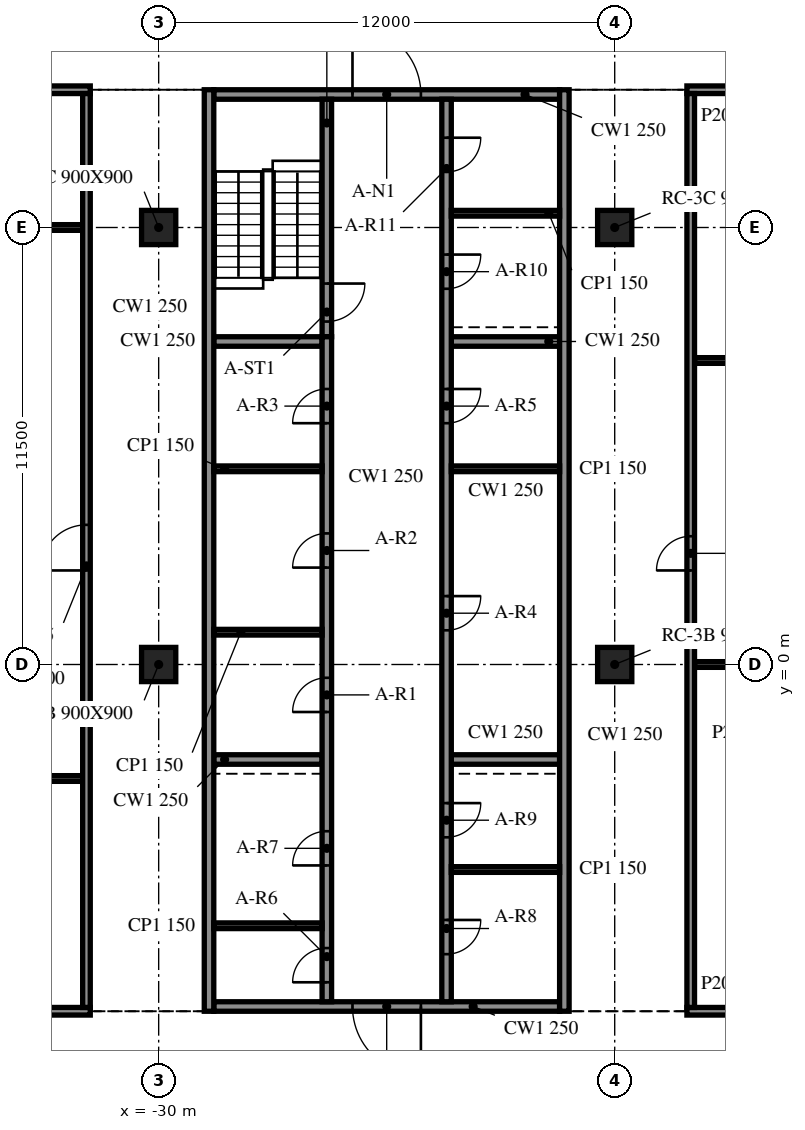
"""IFC4 building model, lengths in metres.
Left out: names, types, materials, properties, quantities, classifications, styles, units other than length and angle.
Written with IfcOpenShell. Run it as: python <this file> out.ifc"""

import sys

from ifc_helpers import new_model, si_unit, direction, frame, frame_2d, origin, origin_2d, place, context, subcontext, project, spatial, rectangle, extrude, element, fill, save


model = new_model("IFC4")
c1 = context("Model", 3, precision=1e-05, world=origin(), true_north=direction((0.0, 1.0)))
c2 = subcontext(c1, "Body", "Model", "MODEL_VIEW")
j1 = project(units=[si_unit("LENGTHUNIT", "METRE"), si_unit("PLANEANGLEUNIT", "RADIAN")], contexts=[c1])
p1 = place(None, origin())
s1 = spatial("IfcSite", under=j1, at=p1, CompositionType="ELEMENT")
p2 = place(p1, origin())
s2 = spatial("IfcBuilding", under=s1, at=p2, CompositionType="ELEMENT")
p3 = place(p2, frame((0.0, 0.0, 263.3)))
s3 = spatial("IfcBuildingStorey", under=s2, at=p3, CompositionType="ELEMENT", Elevation=263.3)
for number, where, z_axis, x_axis in (
    (1, (-30.0, 0.0, -0.34), (0.0, 0.0, 1.0), (1.0, 0.0, 0.0)),
    (2, (-30.0, 11.5, -0.34), (0.0, 0.0, 1.0), (1.0, 0.0, 0.0)),
    (3, (-18.0, 0.0, -0.34), (0.0, 0.0, 1.0), (1.0, 0.0, 0.0)),
    (4, (-18.0, 11.5, -0.34), (0.0, 0.0, 1.0), (1.0, 0.0, 0.0)),
):
    element("IfcColumn", number, at=place(p3, frame(where, z_axis=z_axis, x_axis=x_axis)), inside=s3, PredefinedType="COLUMN", context=c2, shape_type="SweptSolid", body=[
        extrude(rectangle(XDim=0.9, YDim=0.9, at=origin_2d()), origin(), (0.0, 0.0, 1.0), 3.8),
    ])
for number, where, z_axis, x_axis in (
    (5, (-28.675, 15.125, 0.0), (0.0, 0.0, 1.0), (0.0, -1.0, 0.0)),
    (6, (-19.325, -9.125, 0.0), (0.0, 0.0, 1.0), (0.0, 1.0, 0.0)),
):
    element("IfcWall", number, at=place(p3, frame(where, z_axis=z_axis, x_axis=x_axis)), inside=s3, PredefinedType="SOLIDWALL", context=c2, shape_type="SweptSolid", body=[
        extrude(rectangle(XDim=24.25, YDim=0.25, at=frame_2d((12.125, 0.0))), origin(), (0.0, 0.0, 1.0), 3.46),
    ])
p4 = place(p3, frame((-19.45, -9.0, 0.0), z_axis=(0.0, 0.0, 1.0), x_axis=(-1.0, 0.0, 0.0)))
e7 = element("IfcWall", 7, at=p4, inside=s3, PredefinedType="SOLIDWALL", context=c2, shape_type="SweptSolid", body=[
    extrude(rectangle(XDim=9.1, YDim=0.25, at=frame_2d((4.55, 0.0))), origin(), (0.0, 0.0, 1.0), 3.46),
])
p5 = place(p4, frame((3.65, 0.0, 0.0)))
e8 = element("IfcOpeningElement", 8, at=p5, cuts=e7, PredefinedType="OPENING", context=c2, shape_type="SweptSolid", body=[
    extrude(rectangle(XDim=1.8, YDim=2.1, at=frame_2d((0.9, 1.05))), frame((0.0, 0.135, 0.0), z_axis=(0.0, -1.0, 0.0), x_axis=(1.0, 0.0, 0.0)), (0.0, 0.0, 1.0), 0.27),
])
p6 = place(p3, frame((-28.55, 15.0, 0.0), z_axis=(0.0, 0.0, 1.0), x_axis=(1.0, 0.0, 0.0)))
e9 = element("IfcWall", 9, at=p6, inside=s3, PredefinedType="SOLIDWALL", context=c2, shape_type="SweptSolid", body=[
    extrude(rectangle(XDim=9.1, YDim=0.25, at=frame_2d((4.55, 0.0))), origin(), (0.0, 0.0, 1.0), 3.46),
])
p7 = place(p6, frame((3.65, 0.0, 0.0)))
e10 = element("IfcOpeningElement", 10, at=p7, cuts=e9, PredefinedType="OPENING", context=c2, shape_type="SweptSolid", body=[
    extrude(rectangle(XDim=1.8, YDim=2.1, at=frame_2d((0.9, 1.05))), frame((0.0, 0.135, 0.0), z_axis=(0.0, -1.0, 0.0), x_axis=(1.0, 0.0, 0.0)), (0.0, 0.0, 1.0), 0.27),
])
p8 = place(p3, frame((-25.575, -8.875, 0.0), z_axis=(0.0, 0.0, 1.0), x_axis=(0.0, 1.0, 0.0)))
e11 = element("IfcWall", 11, at=p8, inside=s3, PredefinedType="SOLIDWALL", context=c2, shape_type="SweptSolid", body=[
    extrude(rectangle(XDim=17.5, YDim=0.25, at=frame_2d((8.75, 0.0))), origin(), (0.0, 0.0, 1.0), 3.46),
])
p9 = place(p8, frame((7.625, 0.0, 0.0)))
e12 = element("IfcOpeningElement", 12, at=p9, cuts=e11, PredefinedType="OPENING", context=c2, shape_type="SweptSolid", body=[
    extrude(rectangle(XDim=0.9, YDim=2.1, at=frame_2d((0.45, 1.05))), frame((0.0, 0.135, 0.0), z_axis=(0.0, -1.0, 0.0), x_axis=(1.0, 0.0, 0.0)), (0.0, 0.0, 1.0), 0.27),
])
p10 = place(p8, frame((11.425, 0.0, 0.0)))
e13 = element("IfcOpeningElement", 13, at=p10, cuts=e11, PredefinedType="OPENING", context=c2, shape_type="SweptSolid", body=[
    extrude(rectangle(XDim=0.9, YDim=2.1, at=frame_2d((0.45, 1.05))), frame((0.0, 0.135, 0.0), z_axis=(0.0, -1.0, 0.0), x_axis=(1.0, 0.0, 0.0)), (0.0, 0.0, 1.0), 0.27),
])
p11 = place(p8, frame((15.225, 0.0, 0.0)))
e14 = element("IfcOpeningElement", 14, at=p11, cuts=e11, PredefinedType="OPENING", context=c2, shape_type="SweptSolid", body=[
    extrude(rectangle(XDim=0.9, YDim=2.1, at=frame_2d((0.45, 1.05))), frame((0.0, 0.135, 0.0), z_axis=(0.0, -1.0, 0.0), x_axis=(1.0, 0.0, 0.0)), (0.0, 0.0, 1.0), 0.27),
])
p12 = place(p8, frame((0.512, 0.0, 0.0)))
e15 = element("IfcOpeningElement", 15, at=p12, cuts=e11, PredefinedType="OPENING", context=c2, shape_type="SweptSolid", body=[
    extrude(rectangle(XDim=0.9, YDim=2.1, at=frame_2d((0.45, 1.05))), frame((0.0, 0.135, 0.0), z_axis=(0.0, -1.0, 0.0), x_axis=(1.0, 0.0, 0.0)), (0.0, 0.0, 1.0), 0.27),
])
p13 = place(p8, frame((3.587, 0.0, 0.0)))
e16 = element("IfcOpeningElement", 16, at=p13, cuts=e11, PredefinedType="OPENING", context=c2, shape_type="SweptSolid", body=[
    extrude(rectangle(XDim=0.9, YDim=2.1, at=frame_2d((0.45, 1.05))), frame((0.0, 0.135, 0.0), z_axis=(0.0, -1.0, 0.0), x_axis=(1.0, 0.0, 0.0)), (0.0, 0.0, 1.0), 0.27),
])
p14 = place(p3, frame((-25.575, 14.875, 0.0), z_axis=(0.0, 0.0, 1.0), x_axis=(0.0, -1.0, 0.0)))
e17 = element("IfcWall", 17, at=p14, inside=s3, PredefinedType="SOLIDWALL", context=c2, shape_type="SweptSolid", body=[
    extrude(rectangle(XDim=6.25, YDim=0.25, at=frame_2d((3.125, 0.0))), origin(), (0.0, 0.0, 1.0), 3.46),
])
p15 = place(p14, frame((4.85, 0.0, 0.0)))
e18 = element("IfcOpeningElement", 18, at=p15, cuts=e17, PredefinedType="OPENING", context=c2, shape_type="SweptSolid", body=[
    extrude(rectangle(XDim=1.0, YDim=2.1, at=frame_2d((0.5, 1.05))), frame((0.0, 0.135, 0.0), z_axis=(0.0, -1.0, 0.0), x_axis=(1.0, 0.0, 0.0)), (0.0, 0.0, 1.0), 0.27),
])
p16 = place(p3, frame((-22.425, 14.875, 0.0), z_axis=(0.0, 0.0, 1.0), x_axis=(0.0, -1.0, 0.0)))
e19 = element("IfcWall", 19, at=p16, inside=s3, PredefinedType="SOLIDWALL", context=c2, shape_type="SweptSolid", body=[
    extrude(rectangle(XDim=23.75, YDim=0.25, at=frame_2d((11.875, 0.0))), origin(), (0.0, 0.0, 1.0), 3.46),
])
p17 = place(p16, frame((13.075, 0.0, 0.0)))
e20 = element("IfcOpeningElement", 20, at=p17, cuts=e19, PredefinedType="OPENING", context=c2, shape_type="SweptSolid", body=[
    extrude(rectangle(XDim=0.9, YDim=2.1, at=frame_2d((0.45, 1.05))), frame((0.0, 0.135, 0.0), z_axis=(0.0, -1.0, 0.0), x_axis=(1.0, 0.0, 0.0)), (0.0, 0.0, 1.0), 0.27),
])
p18 = place(p16, frame((7.625, 0.0, 0.0)))
e21 = element("IfcOpeningElement", 21, at=p18, cuts=e19, PredefinedType="OPENING", context=c2, shape_type="SweptSolid", body=[
    extrude(rectangle(XDim=0.9, YDim=2.1, at=frame_2d((0.45, 1.05))), frame((0.0, 0.135, 0.0), z_axis=(0.0, -1.0, 0.0), x_axis=(1.0, 0.0, 0.0)), (0.0, 0.0, 1.0), 0.27),
])
p19 = place(p16, frame((21.597, 0.0, 0.0)))
e22 = element("IfcOpeningElement", 22, at=p19, cuts=e19, PredefinedType="OPENING", context=c2, shape_type="SweptSolid", body=[
    extrude(rectangle(XDim=0.9, YDim=2.1, at=frame_2d((0.45, 1.05))), frame((0.0, 0.135, 0.0), z_axis=(0.0, -1.0, 0.0), x_axis=(1.0, 0.0, 0.0)), (0.0, 0.0, 1.0), 0.27),
])
p20 = place(p16, frame((18.522, 0.0, 0.0)))
e23 = element("IfcOpeningElement", 23, at=p20, cuts=e19, PredefinedType="OPENING", context=c2, shape_type="SweptSolid", body=[
    extrude(rectangle(XDim=0.9, YDim=2.1, at=frame_2d((0.45, 1.05))), frame((0.0, 0.135, 0.0), z_axis=(0.0, -1.0, 0.0), x_axis=(1.0, 0.0, 0.0)), (0.0, 0.0, 1.0), 0.27),
])
p21 = place(p16, frame((4.087, 0.0, 0.0)))
e24 = element("IfcOpeningElement", 24, at=p21, cuts=e19, PredefinedType="OPENING", context=c2, shape_type="SweptSolid", body=[
    extrude(rectangle(XDim=0.9, YDim=2.1, at=frame_2d((0.45, 1.05))), frame((0.0, 0.135, 0.0), z_axis=(0.0, -1.0, 0.0), x_axis=(1.0, 0.0, 0.0)), (0.0, 0.0, 1.0), 0.27),
])
p22 = place(p16, frame((1.012, 0.0, 0.0)))
e25 = element("IfcOpeningElement", 25, at=p22, cuts=e19, PredefinedType="OPENING", context=c2, shape_type="SweptSolid", body=[
    extrude(rectangle(XDim=0.9, YDim=2.1, at=frame_2d((0.45, 1.05))), frame((0.0, 0.135, 0.0), z_axis=(0.0, -1.0, 0.0), x_axis=(1.0, 0.0, 0.0)), (0.0, 0.0, 1.0), 0.27),
])
for number, where, z_axis, x_axis in (
    (26, (-28.55, -2.5, 0.0), (0.0, 0.0, 1.0), (1.0, 0.0, 0.0)),
    (27, (-28.55, 8.5, 0.0), (0.0, 0.0, 1.0), (1.0, 0.0, 0.0)),
    (28, (-22.3, -2.5, 0.0), (0.0, 0.0, 1.0), (1.0, 0.0, 0.0)),
    (29, (-22.3, 8.5, 0.0), (0.0, 0.0, 1.0), (1.0, 0.0, 0.0)),
):
    element("IfcWall", number, at=place(p3, frame(where, z_axis=z_axis, x_axis=x_axis)), inside=s3, PredefinedType="SOLIDWALL", context=c2, shape_type="SweptSolid", body=[
        extrude(rectangle(XDim=2.85, YDim=0.25, at=frame_2d((1.425, 0.0))), origin(), (0.0, 0.0, 1.0), 3.46),
    ])
for number, where, z_axis, x_axis in (
    (30, (-28.55, 0.85, 0.0), (0.0, 0.0, 1.0), (1.0, 0.0, 0.0)),
    (31, (-28.55, 5.15, 0.0), (0.0, 0.0, 1.0), (1.0, 0.0, 0.0)),
    (32, (-22.3, 5.15, 0.0), (0.0, 0.0, 1.0), (1.0, 0.0, 0.0)),
    (33, (-28.55, -6.875, 0.0), (0.0, 0.0, 1.0), (1.0, 0.0, 0.0)),
    (34, (-22.3, -5.395, 0.0), (0.0, 0.0, 1.0), (1.0, 0.0, 0.0)),
    (35, (-22.3, 11.875, 0.0), (0.0, 0.0, 1.0), (1.0, 0.0, 0.0)),
):
    element("IfcWall", number, at=place(p3, frame(where, z_axis=z_axis, x_axis=x_axis)), inside=s3, PredefinedType="PARTITIONING", context=c2, shape_type="SweptSolid", body=[
        extrude(rectangle(XDim=2.85, YDim=0.15, at=frame_2d((1.425, 0.0))), origin(), (0.0, 0.0, 1.0), 3.46),
    ])
p23 = place(p3, frame((-47.646, -9.125, 0.0), z_axis=(0.0, 0.0, 1.0), x_axis=(1.0, 0.0, 0.0)))
e36 = element("IfcWall", 36, at=p23, inside=s3, PredefinedType="PARTITIONING", context=c2, shape_type="SweptSolid", body=[
    extrude(rectangle(XDim=15.845, YDim=0.2, at=frame_2d((7.923, 0.0))), origin(), (0.0, 0.0, 1.0), 3.46),
])
p24 = place(p23, frame((7.3, 0.0, 0.0)))
e37 = element("IfcOpeningElement", 37, at=p24, cuts=e36, PredefinedType="OPENING", context=c2, shape_type="SweptSolid", body=[
    extrude(rectangle(XDim=1.2, YDim=2.1, at=frame_2d((0.6, 1.05))), frame((0.0, 0.11, 0.0), z_axis=(0.0, -1.0, 0.0), x_axis=(1.0, 0.0, 0.0)), (0.0, 0.0, 1.0), 0.22),
])
p25 = place(p3, frame((-16.1, -9.125, 0.0), z_axis=(0.0, 0.0, 1.0), x_axis=(1.0, 0.0, 0.0)))
e38 = element("IfcWall", 38, at=p25, inside=s3, PredefinedType="PARTITIONING", context=c2, shape_type="SweptSolid", body=[
    extrude(rectangle(XDim=8.1, YDim=0.2, at=frame_2d((4.05, 0.0))), origin(), (0.0, 0.0, 1.0), 3.46),
])
p26 = place(p25, frame((3.5, 0.0, 0.0)))
e39 = element("IfcOpeningElement", 39, at=p26, cuts=e38, PredefinedType="OPENING", context=c2, shape_type="SweptSolid", body=[
    extrude(rectangle(XDim=0.9, YDim=2.1, at=frame_2d((0.45, 1.05))), frame((0.0, 0.11, 0.0), z_axis=(0.0, -1.0, 0.0), x_axis=(1.0, 0.0, 0.0)), (0.0, 0.0, 1.0), 0.22),
])
p27 = place(p3, frame((-47.975, -3.0, 0.0), z_axis=(0.0, 0.0, 1.0), x_axis=(1.0, 0.0, 0.0)))
e40 = element("IfcWall", 40, at=p27, inside=s3, PredefinedType="PARTITIONING", context=c2, shape_type="SweptSolid", body=[
    extrude(rectangle(XDim=15.975, YDim=0.15, at=frame_2d((7.988, 0.0))), origin(), (0.0, 0.0, 1.0), 3.46),
])
for number, where, z_axis, x_axis in (
    (41, (-15.9, 0.0, 0.0), (0.0, 0.0, 1.0), (1.0, 0.0, 0.0)),
    (42, (-15.9, 8.0, 0.0), (0.0, 0.0, 1.0), (1.0, 0.0, 0.0)),
):
    element("IfcWall", number, at=place(p3, frame(where, z_axis=z_axis, x_axis=x_axis)), inside=s3, PredefinedType="PARTITIONING", context=c2, shape_type="SweptSolid", body=[
        extrude(rectangle(XDim=7.7, YDim=0.15, at=frame_2d((3.85, 0.0))), origin(), (0.0, 0.0, 1.0), 3.46),
    ])
p28 = place(p3, frame((-41.55, 11.5, 0.0), z_axis=(0.0, 0.0, 1.0), x_axis=(1.0, 0.0, 0.0)))
e43 = element("IfcWall", 43, at=p28, inside=s3, PredefinedType="PARTITIONING", context=c2, shape_type="SweptSolid", body=[
    extrude(rectangle(XDim=9.55, YDim=0.15, at=frame_2d((4.775, 0.0))), origin(), (0.0, 0.0, 1.0), 3.46),
])
p29 = place(p3, frame((-47.975, 15.125, 0.0), z_axis=(0.0, 0.0, 1.0), x_axis=(1.0, 0.0, 0.0)))
e44 = element("IfcWall", 44, at=p29, inside=s3, PredefinedType="PARTITIONING", context=c2, shape_type="SweptSolid", body=[
    extrude(rectangle(XDim=16.175, YDim=0.2, at=frame_2d((8.087, 0.0))), origin(), (0.0, 0.0, 1.0), 3.46),
])
p30 = place(p29, frame((7.5, 0.0, 0.0)))
e45 = element("IfcOpeningElement", 45, at=p30, cuts=e44, PredefinedType="OPENING", context=c2, shape_type="SweptSolid", body=[
    extrude(rectangle(XDim=1.0, YDim=2.1, at=frame_2d((0.5, 1.05))), frame((0.0, 0.11, 0.0), z_axis=(0.0, -1.0, 0.0), x_axis=(1.0, 0.0, 0.0)), (0.0, 0.0, 1.0), 0.22),
])
p31 = place(p3, frame((-16.1, 15.125, 0.0), z_axis=(0.0, 0.0, 1.0), x_axis=(1.0, 0.0, 0.0)))
e46 = element("IfcWall", 46, at=p31, inside=s3, PredefinedType="PARTITIONING", context=c2, shape_type="SweptSolid", body=[
    extrude(rectangle(XDim=8.1, YDim=0.2, at=frame_2d((4.05, 0.0))), origin(), (0.0, 0.0, 1.0), 3.46),
])
p32 = place(p31, frame((3.5, 0.0, 0.0)))
e47 = element("IfcOpeningElement", 47, at=p32, cuts=e46, PredefinedType="OPENING", context=c2, shape_type="SweptSolid", body=[
    extrude(rectangle(XDim=1.0, YDim=2.1, at=frame_2d((0.5, 1.05))), frame((0.0, 0.11, 0.0), z_axis=(0.0, -1.0, 0.0), x_axis=(1.0, 0.0, 0.0)), (0.0, 0.0, 1.0), 0.22),
])
p33 = place(p3, frame((-31.9, -9.025, 0.0), z_axis=(0.0, 0.0, 1.0), x_axis=(0.0, 1.0, 0.0)))
e48 = element("IfcWall", 48, at=p33, inside=s3, PredefinedType="PARTITIONING", context=c2, shape_type="SweptSolid", body=[
    extrude(rectangle(XDim=24.05, YDim=0.2, at=frame_2d((12.025, 0.0))), origin(), (0.0, 0.0, 1.0), 3.46),
])
p34 = place(p33, frame((11.5, 0.0, 0.0)))
e49 = element("IfcOpeningElement", 49, at=p34, cuts=e48, PredefinedType="OPENING", context=c2, shape_type="SweptSolid", body=[
    extrude(rectangle(XDim=1.2, YDim=2.1, at=frame_2d((0.6, 1.05))), frame((0.0, 0.11, 0.0), z_axis=(0.0, -1.0, 0.0), x_axis=(1.0, 0.0, 0.0)), (0.0, 0.0, 1.0), 0.22),
])
p35 = place(p3, frame((-16.0, -9.025, 0.0), z_axis=(0.0, 0.0, 1.0), x_axis=(0.0, 1.0, 0.0)))
e50 = element("IfcWall", 50, at=p35, inside=s3, PredefinedType="PARTITIONING", context=c2, shape_type="SweptSolid", body=[
    extrude(rectangle(XDim=24.05, YDim=0.2, at=frame_2d((12.025, 0.0))), origin(), (0.0, 0.0, 1.0), 3.46),
])
p36 = place(p35, frame((11.5, 0.0, 0.0)))
e51 = element("IfcOpeningElement", 51, at=p36, cuts=e50, PredefinedType="OPENING", context=c2, shape_type="SweptSolid", body=[
    extrude(rectangle(XDim=0.9, YDim=2.1, at=frame_2d((0.45, 1.05))), frame((0.0, 0.11, 0.0), z_axis=(0.0, -1.0, 0.0), x_axis=(1.0, 0.0, 0.0)), (0.0, 0.0, 1.0), 0.22),
])
p37 = place(p5, origin())
e52 = element("IfcDoor", 52, at=p37, inside=s3, OperationType="DOUBLE_DOOR_SINGLE_SWING", PredefinedType="DOOR", context=c2, shape_type="SweptSolid", body=[
    extrude(rectangle(XDim=1.8, YDim=2.1, at=frame_2d((0.9, 1.05))), frame((0.0, 0.025, 0.0), z_axis=(0.0, -1.0, 0.0), x_axis=(1.0, 0.0, 0.0)), (0.0, 0.0, 1.0), 0.05),
])
fill(e8, e52)
p38 = place(p7, origin())
e53 = element("IfcDoor", 53, at=p38, inside=s3, OperationType="DOUBLE_DOOR_SINGLE_SWING", PredefinedType="DOOR", context=c2, shape_type="SweptSolid", body=[
    extrude(rectangle(XDim=1.8, YDim=2.1, at=frame_2d((0.9, 1.05))), frame((0.0, 0.025, 0.0), z_axis=(0.0, -1.0, 0.0), x_axis=(1.0, 0.0, 0.0)), (0.0, 0.0, 1.0), 0.05),
])
fill(e10, e53)
p39 = place(p9, origin())
e54 = element("IfcDoor", 54, at=p39, inside=s3, OperationType="SINGLE_SWING_LEFT", PredefinedType="DOOR", context=c2, shape_type="SweptSolid", body=[
    extrude(rectangle(XDim=0.9, YDim=2.1, at=frame_2d((0.45, 1.05))), frame((0.0, 0.025, 0.0), z_axis=(0.0, -1.0, 0.0), x_axis=(1.0, 0.0, 0.0)), (0.0, 0.0, 1.0), 0.05),
])
fill(e12, e54)
p40 = place(p10, origin())
e55 = element("IfcDoor", 55, at=p40, inside=s3, OperationType="SINGLE_SWING_RIGHT", PredefinedType="DOOR", context=c2, shape_type="SweptSolid", body=[
    extrude(rectangle(XDim=0.9, YDim=2.1, at=frame_2d((0.45, 1.05))), frame((0.0, 0.025, 0.0), z_axis=(0.0, -1.0, 0.0), x_axis=(1.0, 0.0, 0.0)), (0.0, 0.0, 1.0), 0.05),
])
fill(e13, e55)
p41 = place(p11, origin())
e56 = element("IfcDoor", 56, at=p41, inside=s3, OperationType="SINGLE_SWING_LEFT", PredefinedType="DOOR", context=c2, shape_type="SweptSolid", body=[
    extrude(rectangle(XDim=0.9, YDim=2.1, at=frame_2d((0.45, 1.05))), frame((0.0, 0.025, 0.0), z_axis=(0.0, -1.0, 0.0), x_axis=(1.0, 0.0, 0.0)), (0.0, 0.0, 1.0), 0.05),
])
fill(e14, e56)
p42 = place(p17, origin())
e57 = element("IfcDoor", 57, at=p42, inside=s3, OperationType="SINGLE_SWING_RIGHT", PredefinedType="DOOR", context=c2, shape_type="SweptSolid", body=[
    extrude(rectangle(XDim=0.9, YDim=2.1, at=frame_2d((0.45, 1.05))), frame((0.0, 0.025, 0.0), z_axis=(0.0, -1.0, 0.0), x_axis=(1.0, 0.0, 0.0)), (0.0, 0.0, 1.0), 0.05),
])
fill(e20, e57)
p43 = place(p18, origin())
e58 = element("IfcDoor", 58, at=p43, inside=s3, OperationType="SINGLE_SWING_LEFT", PredefinedType="DOOR", context=c2, shape_type="SweptSolid", body=[
    extrude(rectangle(XDim=0.9, YDim=2.1, at=frame_2d((0.45, 1.05))), frame((0.0, 0.025, 0.0), z_axis=(0.0, -1.0, 0.0), x_axis=(1.0, 0.0, 0.0)), (0.0, 0.0, 1.0), 0.05),
])
fill(e21, e58)
p44 = place(p12, origin())
e59 = element("IfcDoor", 59, at=p44, inside=s3, OperationType="SINGLE_SWING_RIGHT", PredefinedType="DOOR", context=c2, shape_type="SweptSolid", body=[
    extrude(rectangle(XDim=0.9, YDim=2.1, at=frame_2d((0.45, 1.05))), frame((0.0, 0.025, 0.0), z_axis=(0.0, -1.0, 0.0), x_axis=(1.0, 0.0, 0.0)), (0.0, 0.0, 1.0), 0.05),
])
fill(e15, e59)
p45 = place(p13, origin())
e60 = element("IfcDoor", 60, at=p45, inside=s3, OperationType="SINGLE_SWING_LEFT", PredefinedType="DOOR", context=c2, shape_type="SweptSolid", body=[
    extrude(rectangle(XDim=0.9, YDim=2.1, at=frame_2d((0.45, 1.05))), frame((0.0, 0.025, 0.0), z_axis=(0.0, -1.0, 0.0), x_axis=(1.0, 0.0, 0.0)), (0.0, 0.0, 1.0), 0.05),
])
fill(e16, e60)
p46 = place(p19, origin())
e61 = element("IfcDoor", 61, at=p46, inside=s3, OperationType="SINGLE_SWING_RIGHT", PredefinedType="DOOR", context=c2, shape_type="SweptSolid", body=[
    extrude(rectangle(XDim=0.9, YDim=2.1, at=frame_2d((0.45, 1.05))), frame((0.0, 0.025, 0.0), z_axis=(0.0, -1.0, 0.0), x_axis=(1.0, 0.0, 0.0)), (0.0, 0.0, 1.0), 0.05),
])
fill(e22, e61)
p47 = place(p20, origin())
e62 = element("IfcDoor", 62, at=p47, inside=s3, OperationType="SINGLE_SWING_LEFT", PredefinedType="DOOR", context=c2, shape_type="SweptSolid", body=[
    extrude(rectangle(XDim=0.9, YDim=2.1, at=frame_2d((0.45, 1.05))), frame((0.0, 0.025, 0.0), z_axis=(0.0, -1.0, 0.0), x_axis=(1.0, 0.0, 0.0)), (0.0, 0.0, 1.0), 0.05),
])
fill(e23, e62)
p48 = place(p21, origin())
e63 = element("IfcDoor", 63, at=p48, inside=s3, OperationType="SINGLE_SWING_RIGHT", PredefinedType="DOOR", context=c2, shape_type="SweptSolid", body=[
    extrude(rectangle(XDim=0.9, YDim=2.1, at=frame_2d((0.45, 1.05))), frame((0.0, 0.025, 0.0), z_axis=(0.0, -1.0, 0.0), x_axis=(1.0, 0.0, 0.0)), (0.0, 0.0, 1.0), 0.05),
])
fill(e24, e63)
p49 = place(p22, origin())
e64 = element("IfcDoor", 64, at=p49, inside=s3, OperationType="SINGLE_SWING_LEFT", PredefinedType="DOOR", context=c2, shape_type="SweptSolid", body=[
    extrude(rectangle(XDim=0.9, YDim=2.1, at=frame_2d((0.45, 1.05))), frame((0.0, 0.025, 0.0), z_axis=(0.0, -1.0, 0.0), x_axis=(1.0, 0.0, 0.0)), (0.0, 0.0, 1.0), 0.05),
])
fill(e25, e64)
p50 = place(p15, origin())
e65 = element("IfcDoor", 65, at=p50, inside=s3, OperationType="SINGLE_SWING_RIGHT", PredefinedType="DOOR", context=c2, shape_type="SweptSolid", body=[
    extrude(rectangle(XDim=1.0, YDim=2.1, at=frame_2d((0.5, 1.05))), frame((0.0, 0.025, 0.0), z_axis=(0.0, -1.0, 0.0), x_axis=(1.0, 0.0, 0.0)), (0.0, 0.0, 1.0), 0.05),
])
fill(e18, e65)
p51 = place(p34, origin())
e66 = element("IfcDoor", 66, at=p51, inside=s3, OperationType="SINGLE_SWING_RIGHT", PredefinedType="DOOR", context=c2, shape_type="SweptSolid", body=[
    extrude(rectangle(XDim=1.2, YDim=2.1, at=frame_2d((0.6, 1.05))), frame((0.0, 0.025, 0.0), z_axis=(0.0, -1.0, 0.0), x_axis=(1.0, 0.0, 0.0)), (0.0, 0.0, 1.0), 0.05),
])
fill(e49, e66)
p52 = place(p36, origin())
e67 = element("IfcDoor", 67, at=p52, inside=s3, OperationType="SINGLE_SWING_RIGHT", PredefinedType="DOOR", context=c2, shape_type="SweptSolid", body=[
    extrude(rectangle(XDim=0.9, YDim=2.1, at=frame_2d((0.45, 1.05))), frame((0.0, 0.025, 0.0), z_axis=(0.0, -1.0, 0.0), x_axis=(1.0, 0.0, 0.0)), (0.0, 0.0, 1.0), 0.05),
])
fill(e51, e67)
save(model, sys.argv[1])
